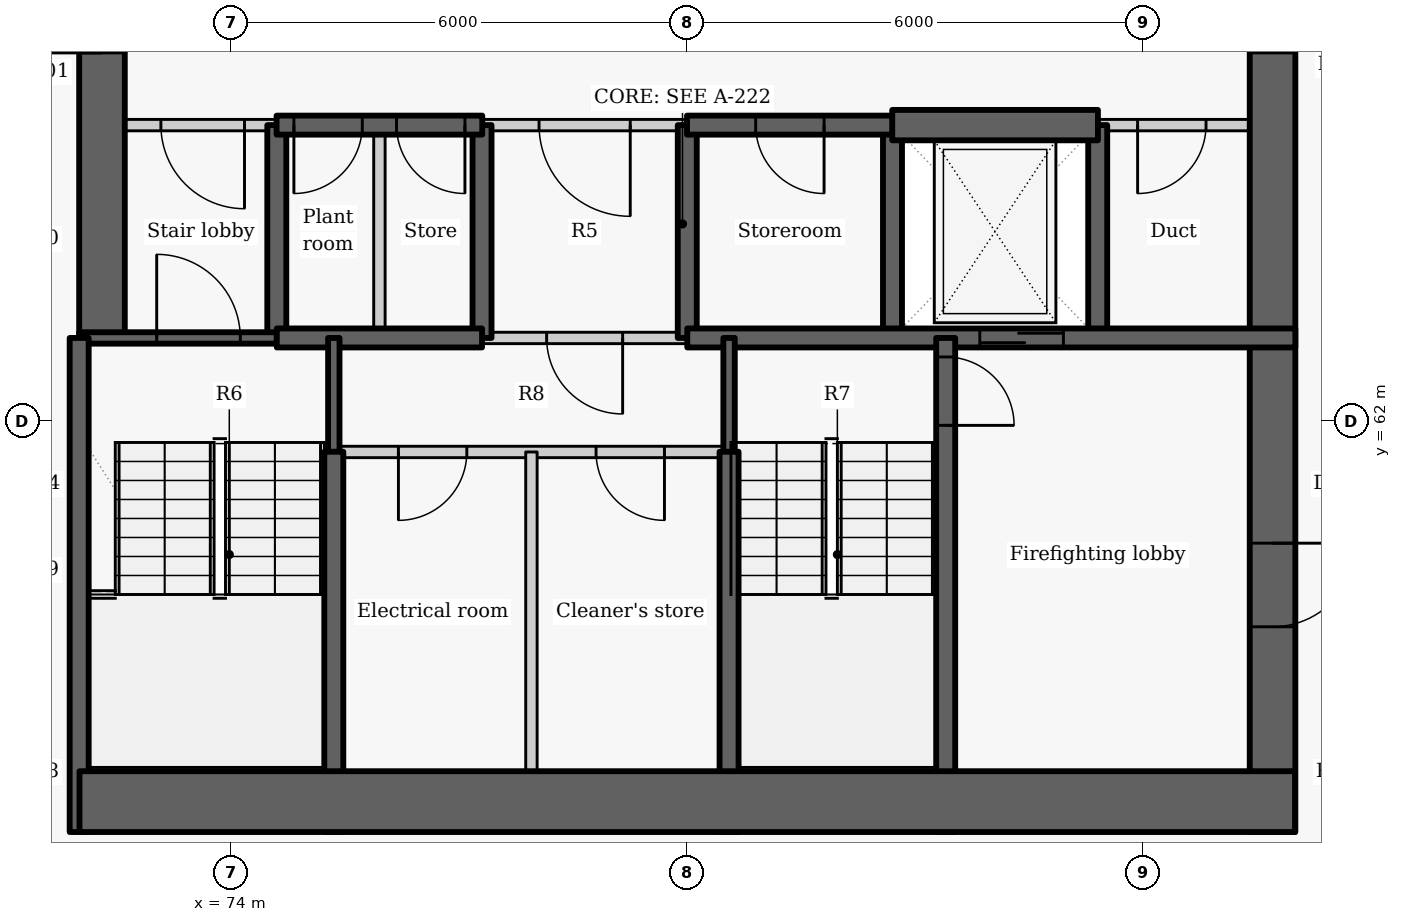
"""IFC4 building model, lengths in metres.
Left out: names, types, materials, properties, quantities, classifications, styles, units other than length and angle.
Written with IfcOpenShell. Run it as: python <this file> out.ifc"""

import sys

from ifc_helpers import new_model, si_unit, direction, frame, frame_2d, origin, place, context, subcontext, project, spatial, rectangle, extrude, element, fill, save


model = new_model("IFC4")
c1 = context("Model", 3, precision=1e-05, world=origin(), true_north=direction((0.0, 1.0)))
c2 = subcontext(c1, "Body", "Model", "MODEL_VIEW")
j1 = project(units=[si_unit("LENGTHUNIT", "METRE"), si_unit("PLANEANGLEUNIT", "RADIAN")], contexts=[c1])
p1 = place(None, origin())
s1 = spatial("IfcSite", under=j1, at=p1, CompositionType="ELEMENT")
p2 = place(p1, origin())
s2 = spatial("IfcBuilding", under=s1, at=p2, CompositionType="ELEMENT")
p3 = place(p2, frame((0.0, 0.0, 117.3)))
s3 = spatial("IfcBuildingStorey", under=s2, at=p3, CompositionType="ELEMENT", Elevation=117.3)
p4 = place(p3, frame((74.6, 63.1, -0.275), z_axis=(0.0, 0.0, 1.0), x_axis=(0.0, 1.0, 0.0)))
e1 = element("IfcWall", 1, at=p4, inside=s3, PredefinedType="SHEAR", context=c2, shape_type="SweptSolid", body=[
    extrude(rectangle(XDim=2.8, YDim=0.25, at=frame_2d((1.4, 0.0))), origin(), (0.0, 0.0, 1.0), 3.225),
])
p5 = place(p3, frame((72.3, 63.1, -0.275), z_axis=(0.0, 0.0, 1.0), x_axis=(0.0, 1.0, 0.0)))
e2 = element("IfcWall", 2, at=p5, inside=s3, PredefinedType="SHEAR", context=c2, shape_type="SweptSolid", body=[
    extrude(rectangle(XDim=9.1, YDim=0.6, at=frame_2d((4.55, 0.0))), origin(), (0.0, 0.0, 1.0), 3.225),
])
p6 = place(p5, frame((3.75, 0.0, 0.275)))
e3 = element("IfcOpeningElement", 3, at=p6, cuts=e2, PredefinedType="OPENING", context=c2, shape_type="SweptSolid", body=[
    extrude(rectangle(XDim=1.5, YDim=2.1, at=frame_2d((0.75, 1.05))), frame((0.0, 0.31, 0.0), z_axis=(0.0, -1.0, 0.0), x_axis=(1.0, 0.0, 0.0)), (0.0, 0.0, 1.0), 0.62),
])
for number, where, z_axis, x_axis in (
    (4, (77.3, 63.1, -0.275), (0.0, 0.0, 1.0), (0.0, 1.0, 0.0)),
    (5, (80.0, 63.1, -0.275), (0.0, 0.0, 1.0), (0.0, 1.0, 0.0)),
    (6, (82.7, 63.1, -0.275), (0.0, 0.0, 1.0), (0.0, 1.0, 0.0)),
    (7, (85.4, 63.1, -0.275), (0.0, 0.0, 1.0), (0.0, 1.0, 0.0)),
):
    element("IfcWall", number, at=place(p3, frame(where, z_axis=z_axis, x_axis=x_axis)), inside=s3, PredefinedType="SHEAR", context=c2, shape_type="SweptSolid", body=[
        extrude(rectangle(XDim=2.8, YDim=0.25, at=frame_2d((1.4, 0.0))), origin(), (0.0, 0.0, 1.0), 3.225),
    ])
p7 = place(p3, frame((87.7, 72.2, -0.275), z_axis=(0.0, 0.0, 1.0), x_axis=(0.0, -1.0, 0.0)))
e8 = element("IfcWall", 8, at=p7, inside=s3, PredefinedType="SHEAR", context=c2, shape_type="SweptSolid", body=[
    extrude(rectangle(XDim=15.6, YDim=0.6, at=frame_2d((7.8, 0.0))), origin(), (0.0, 0.0, 1.0), 3.225),
])
p8 = place(p7, frame((3.85, 0.0, 0.275)))
e9 = element("IfcOpeningElement", 9, at=p8, cuts=e8, PredefinedType="OPENING", context=c2, shape_type="SweptSolid", body=[
    extrude(rectangle(XDim=1.5, YDim=2.1, at=frame_2d((0.75, 1.05))), frame((0.0, 0.31, 0.0), z_axis=(0.0, -1.0, 0.0), x_axis=(1.0, 0.0, 0.0)), (0.0, 0.0, 1.0), 0.62),
])
p9 = place(p7, frame((11.8, 0.0, 0.275)))
e10 = element("IfcOpeningElement", 10, at=p9, cuts=e8, PredefinedType="OPENING", context=c2, shape_type="SweptSolid", body=[
    extrude(rectangle(XDim=1.1, YDim=2.1, at=frame_2d((0.55, 1.05))), frame((0.0, 0.31, 0.0), z_axis=(0.0, -1.0, 0.0), x_axis=(1.0, 0.0, 0.0)), (0.0, 0.0, 1.0), 0.62),
])
p10 = place(p3, frame((74.603, 65.9, 0.0), z_axis=(0.0, 0.0, 1.0), x_axis=(-1.0, 0.0, 0.0)))
e11 = element("IfcWall", 11, at=p10, inside=s3, PredefinedType="PARTITIONING", context=c2, shape_type="SweptSolid", body=[
    extrude(rectangle(XDim=2.603, YDim=0.15, at=frame_2d((1.302, 0.0))), origin(), (0.0, 0.0, 1.0), 2.95),
])
p11 = place(p10, frame((0.428, 0.0, 0.0)))
e12 = element("IfcOpeningElement", 12, at=p11, cuts=e11, PredefinedType="OPENING", context=c2, shape_type="SweptSolid", body=[
    extrude(rectangle(XDim=1.1, YDim=2.1, at=frame_2d((0.55, 1.05))), frame((0.0, 0.085, 0.0), z_axis=(0.0, -1.0, 0.0), x_axis=(1.0, 0.0, 0.0)), (0.0, 0.0, 1.0), 0.17),
])
p12 = place(p3, frame((80.003, 65.9, 0.0), z_axis=(0.0, 0.0, 1.0), x_axis=(-1.0, 0.0, 0.0)))
e13 = element("IfcWall", 13, at=p12, inside=s3, PredefinedType="PARTITIONING", context=c2, shape_type="SweptSolid", body=[
    extrude(rectangle(XDim=2.706, YDim=0.15, at=frame_2d((1.353, 0.0))), origin(), (0.0, 0.0, 1.0), 2.95),
])
p13 = place(p12, frame((0.753, 0.0, 0.0)))
e14 = element("IfcOpeningElement", 14, at=p13, cuts=e13, PredefinedType="OPENING", context=c2, shape_type="SweptSolid", body=[
    extrude(rectangle(XDim=1.2, YDim=2.1, at=frame_2d((0.6, 1.05))), frame((0.0, 0.085, 0.0), z_axis=(0.0, -1.0, 0.0), x_axis=(1.0, 0.0, 0.0)), (0.0, 0.0, 1.0), 0.17),
])
p14 = place(p3, frame((88.0, 65.9, 0.0), z_axis=(0.0, 0.0, 1.0), x_axis=(-1.0, 0.0, 0.0)))
e15 = element("IfcWall", 15, at=p14, inside=s3, PredefinedType="PARTITIONING", context=c2, shape_type="SweptSolid", body=[
    extrude(rectangle(XDim=2.603, YDim=0.15, at=frame_2d((1.302, 0.0))), origin(), (0.0, 0.0, 1.0), 2.95),
])
p15 = place(p14, frame((1.175, 0.0, 0.0)))
e16 = element("IfcOpeningElement", 16, at=p15, cuts=e15, PredefinedType="OPENING", context=c2, shape_type="SweptSolid", body=[
    extrude(rectangle(XDim=0.9, YDim=2.1, at=frame_2d((0.45, 1.05))), frame((0.0, 0.085, 0.0), z_axis=(0.0, -1.0, 0.0), x_axis=(1.0, 0.0, 0.0)), (0.0, 0.0, 1.0), 0.17),
])
p16 = place(p3, frame((77.303, 65.9, -0.275), z_axis=(0.0, 0.0, 1.0), x_axis=(-1.0, 0.0, 0.0)))
e17 = element("IfcWall", 17, at=p16, inside=s3, PredefinedType="SHEAR", context=c2, shape_type="SweptSolid", body=[
    extrude(rectangle(XDim=2.706, YDim=0.25, at=frame_2d((1.353, 0.0))), origin(), (0.0, 0.0, 1.0), 3.225),
])
p17 = place(p16, frame((1.578, 0.0, 0.275)))
e18 = element("IfcOpeningElement", 18, at=p17, cuts=e17, PredefinedType="OPENING", context=c2, shape_type="SweptSolid", body=[
    extrude(rectangle(XDim=0.9, YDim=2.1, at=frame_2d((0.45, 1.05))), frame((0.0, 0.135, 0.0), z_axis=(0.0, -1.0, 0.0), x_axis=(1.0, 0.0, 0.0)), (0.0, 0.0, 1.0), 0.27),
])
p18 = place(p16, frame((0.228, 0.0, 0.275)))
e19 = element("IfcOpeningElement", 19, at=p18, cuts=e17, PredefinedType="OPENING", context=c2, shape_type="SweptSolid", body=[
    extrude(rectangle(XDim=0.9, YDim=2.1, at=frame_2d((0.45, 1.05))), frame((0.0, 0.135, 0.0), z_axis=(0.0, -1.0, 0.0), x_axis=(1.0, 0.0, 0.0)), (0.0, 0.0, 1.0), 0.27),
])
p19 = place(p3, frame((82.703, 65.9, -0.275), z_axis=(0.0, 0.0, 1.0), x_axis=(-1.0, 0.0, 0.0)))
e20 = element("IfcWall", 20, at=p19, inside=s3, PredefinedType="SHEAR", context=c2, shape_type="SweptSolid", body=[
    extrude(rectangle(XDim=2.706, YDim=0.25, at=frame_2d((1.353, 0.0))), origin(), (0.0, 0.0, 1.0), 3.225),
])
p20 = place(p19, frame((0.903, 0.0, 0.275)))
e21 = element("IfcOpeningElement", 21, at=p20, cuts=e20, PredefinedType="OPENING", context=c2, shape_type="SweptSolid", body=[
    extrude(rectangle(XDim=0.9, YDim=2.1, at=frame_2d((0.45, 1.05))), frame((0.0, 0.135, 0.0), z_axis=(0.0, -1.0, 0.0), x_axis=(1.0, 0.0, 0.0)), (0.0, 0.0, 1.0), 0.27),
])
p21 = place(p3, frame((82.697, 65.9, -0.275), z_axis=(0.0, 0.0, 1.0), x_axis=(1.0, 0.0, 0.0)))
e22 = element("IfcWall", 22, at=p21, inside=s3, PredefinedType="SHEAR", context=c2, shape_type="SweptSolid", body=[
    extrude(rectangle(XDim=2.706, YDim=0.4, at=frame_2d((1.353, 0.0))), origin(), (0.0, 0.0, 1.0), 3.225),
])
p22 = place(p3, frame((72.0, 63.1, -0.275), z_axis=(0.0, 0.0, 1.0), x_axis=(1.0, 0.0, 0.0)))
e23 = element("IfcWall", 23, at=p22, inside=s3, PredefinedType="SHEAR", context=c2, shape_type="SweptSolid", body=[
    extrude(rectangle(XDim=2.6, YDim=0.15, at=frame_2d((1.3, 0.0))), origin(), (0.0, 0.0, 1.0), 3.225),
])
p23 = place(p22, frame((1.02, 0.0, 0.275)))
e24 = element("IfcOpeningElement", 24, at=p23, cuts=e23, PredefinedType="OPENING", context=c2, shape_type="SweptSolid", body=[
    extrude(rectangle(XDim=1.1, YDim=2.1, at=frame_2d((0.55, 1.05))), frame((0.0, 0.085, 0.0), z_axis=(0.0, -1.0, 0.0), x_axis=(1.0, 0.0, 0.0)), (0.0, 0.0, 1.0), 0.17),
])
p24 = place(p3, frame((75.95, 63.1, 0.0), z_axis=(0.0, 0.0, 1.0), x_axis=(0.0, 1.0, 0.0)))
e25 = element("IfcWall", 25, at=p24, inside=s3, PredefinedType="PARTITIONING", context=c2, shape_type="SweptSolid", body=[
    extrude(rectangle(XDim=2.8, YDim=0.15, at=frame_2d((1.4, 0.0))), origin(), (0.0, 0.0, 1.0), 2.95),
])
p25 = place(p3, frame((74.6, 63.1, -0.275), z_axis=(0.0, 0.0, 1.0), x_axis=(1.0, 0.0, 0.0)))
e26 = element("IfcWall", 26, at=p25, inside=s3, PredefinedType="SHEAR", context=c2, shape_type="SweptSolid", body=[
    extrude(rectangle(XDim=2.7, YDim=0.25, at=frame_2d((1.35, 0.0))), origin(), (0.0, 0.0, 1.0), 3.225),
])
p26 = place(p3, frame((80.0, 63.1, -0.275), z_axis=(0.0, 0.0, 1.0), x_axis=(1.0, 0.0, 0.0)))
e27 = element("IfcWall", 27, at=p26, inside=s3, PredefinedType="SHEAR", context=c2, shape_type="SweptSolid", body=[
    extrude(rectangle(XDim=8.0, YDim=0.25, at=frame_2d((4.0, 0.0))), origin(), (0.0, 0.0, 1.0), 3.225),
])
p27 = place(p26, frame((3.849, 0.0, 0.275)))
e28 = element("IfcOpeningElement", 28, at=p27, cuts=e27, PredefinedType="OPENING", context=c2, shape_type="SweptSolid", body=[
    extrude(rectangle(XDim=1.1, YDim=2.1, at=frame_2d((0.55, 1.05))), frame((0.0, 0.135, 0.0), z_axis=(0.0, -1.0, 0.0), x_axis=(1.0, 0.0, 0.0)), (0.0, 0.0, 1.0), 0.27),
])
p28 = place(p3, frame((80.0, 63.1, 0.0), z_axis=(0.0, 0.0, 1.0), x_axis=(-1.0, 0.0, 0.0)))
e29 = element("IfcWall", 29, at=p28, inside=s3, PredefinedType="PARTITIONING", context=c2, shape_type="SweptSolid", body=[
    extrude(rectangle(XDim=2.7, YDim=0.15, at=frame_2d((1.35, 0.0))), origin(), (0.0, 0.0, 1.0), 2.95),
])
p29 = place(p28, frame((0.85, 0.0, 0.0)))
e30 = element("IfcOpeningElement", 30, at=p29, cuts=e29, PredefinedType="OPENING", context=c2, shape_type="SweptSolid", body=[
    extrude(rectangle(XDim=1.0, YDim=2.1, at=frame_2d((0.5, 1.05))), frame((0.0, 0.085, 0.0), z_axis=(0.0, -1.0, 0.0), x_axis=(1.0, 0.0, 0.0)), (0.0, 0.0, 1.0), 0.17),
])
p30 = place(p3, frame((75.35, 61.597, -0.275), z_axis=(0.0, 0.0, 1.0), x_axis=(0.0, 1.0, 0.0)))
e31 = element("IfcWall", 31, at=p30, inside=s3, PredefinedType="SHEAR", context=c2, shape_type="SweptSolid", body=[
    extrude(rectangle(XDim=1.503, YDim=0.15, at=frame_2d((0.751, 0.0))), origin(), (0.0, 0.0, 1.0), 3.225),
])
p31 = place(p3, frame((75.35, 56.6, -0.275), z_axis=(0.0, 0.0, 1.0), x_axis=(0.0, 1.0, 0.0)))
e32 = element("IfcWall", 32, at=p31, inside=s3, PredefinedType="SHEAR", context=c2, shape_type="SweptSolid", body=[
    extrude(rectangle(XDim=5.003, YDim=0.25, at=frame_2d((2.501, 0.0))), origin(), (0.0, 0.0, 1.0), 3.225),
])
p32 = place(p3, frame((72.0, 56.6, -0.275), z_axis=(0.0, 0.0, 1.0), x_axis=(0.0, 1.0, 0.0)))
e33 = element("IfcWall", 33, at=p32, inside=s3, PredefinedType="SHEAR", context=c2, shape_type="SweptSolid", body=[
    extrude(rectangle(XDim=6.5, YDim=0.25, at=frame_2d((3.25, 0.0))), origin(), (0.0, 0.0, 1.0), 3.225),
])
p33 = place(p3, frame((83.4, 63.1, -0.275), z_axis=(0.0, 0.0, 1.0), x_axis=(0.0, -1.0, 0.0)))
e34 = element("IfcWall", 34, at=p33, inside=s3, PredefinedType="SHEAR", context=c2, shape_type="SweptSolid", body=[
    extrude(rectangle(XDim=6.5, YDim=0.25, at=frame_2d((3.25, 0.0))), origin(), (0.0, 0.0, 1.0), 3.225),
])
p34 = place(p33, frame((0.25, 0.0, 0.275)))
e35 = element("IfcOpeningElement", 35, at=p34, cuts=e34, PredefinedType="OPENING", context=c2, shape_type="SweptSolid", body=[
    extrude(rectangle(XDim=0.9, YDim=2.1, at=frame_2d((0.45, 1.05))), frame((0.0, 0.135, 0.0), z_axis=(0.0, -1.0, 0.0), x_axis=(1.0, 0.0, 0.0)), (0.0, 0.0, 1.0), 0.27),
])
p35 = place(p3, frame((80.55, 61.597, -0.275), z_axis=(0.0, 0.0, 1.0), x_axis=(0.0, 1.0, 0.0)))
e36 = element("IfcWall", 36, at=p35, inside=s3, PredefinedType="SHEAR", context=c2, shape_type="SweptSolid", body=[
    extrude(rectangle(XDim=1.503, YDim=0.15, at=frame_2d((0.751, 0.0))), origin(), (0.0, 0.0, 1.0), 3.225),
])
p36 = place(p3, frame((80.55, 56.6, -0.275), z_axis=(0.0, 0.0, 1.0), x_axis=(0.0, 1.0, 0.0)))
e37 = element("IfcWall", 37, at=p36, inside=s3, PredefinedType="SHEAR", context=c2, shape_type="SweptSolid", body=[
    extrude(rectangle(XDim=5.003, YDim=0.25, at=frame_2d((2.501, 0.0))), origin(), (0.0, 0.0, 1.0), 3.225),
])
p37 = place(p3, frame((80.55, 61.6, 0.0), z_axis=(0.0, 0.0, 1.0), x_axis=(-1.0, 0.0, 0.0)))
e38 = element("IfcWall", 38, at=p37, inside=s3, PredefinedType="PARTITIONING", context=c2, shape_type="SweptSolid", body=[
    extrude(rectangle(XDim=5.2, YDim=0.15, at=frame_2d((2.6, 0.0))), origin(), (0.0, 0.0, 1.0), 2.95),
])
p38 = place(p37, frame((3.45, 0.0, 0.0)))
e39 = element("IfcOpeningElement", 39, at=p38, cuts=e38, PredefinedType="OPENING", context=c2, shape_type="SweptSolid", body=[
    extrude(rectangle(XDim=0.9, YDim=2.1, at=frame_2d((0.45, 1.05))), frame((0.0, 0.085, 0.0), z_axis=(0.0, -1.0, 0.0), x_axis=(1.0, 0.0, 0.0)), (0.0, 0.0, 1.0), 0.17),
])
p39 = place(p37, frame((0.85, 0.0, 0.0)))
e40 = element("IfcOpeningElement", 40, at=p39, cuts=e38, PredefinedType="OPENING", context=c2, shape_type="SweptSolid", body=[
    extrude(rectangle(XDim=0.9, YDim=2.1, at=frame_2d((0.45, 1.05))), frame((0.0, 0.085, 0.0), z_axis=(0.0, -1.0, 0.0), x_axis=(1.0, 0.0, 0.0)), (0.0, 0.0, 1.0), 0.17),
])
p40 = place(p3, frame((77.95, 56.6, 0.0), z_axis=(0.0, 0.0, 1.0), x_axis=(0.0, 1.0, 0.0)))
e41 = element("IfcWall", 41, at=p40, inside=s3, PredefinedType="PARTITIONING", context=c2, shape_type="SweptSolid", body=[
    extrude(rectangle(XDim=5.0, YDim=0.15, at=frame_2d((2.5, 0.0))), origin(), (0.0, 0.0, 1.0), 2.95),
])
p41 = place(p3, frame((72.004, 57.0, -0.275), z_axis=(0.0, 0.0, 1.0), x_axis=(1.0, 0.0, 0.0)))
e42 = element("IfcWall", 42, at=p41, inside=s3, PredefinedType="SHEAR", context=c2, shape_type="SweptSolid", body=[
    extrude(rectangle(XDim=15.992, YDim=0.8, at=frame_2d((7.996, 0.0))), origin(), (0.0, 0.0, 1.0), 3.225),
])
p42 = place(p11, origin())
e43 = element("IfcDoor", 43, at=p42, inside=s3, OperationType="SINGLE_SWING_LEFT", PredefinedType="DOOR", context=c2, shape_type="SweptSolid", body=[
    extrude(rectangle(XDim=1.1, YDim=2.1, at=frame_2d((0.55, 1.05))), frame((0.0, 0.025, 0.0), z_axis=(0.0, -1.0, 0.0), x_axis=(1.0, 0.0, 0.0)), (0.0, 0.0, 1.0), 0.05),
])
fill(e12, e43)
p43 = place(p17, origin())
e44 = element("IfcDoor", 44, at=p43, inside=s3, OperationType="SINGLE_SWING_RIGHT", PredefinedType="DOOR", context=c2, shape_type="SweptSolid", body=[
    extrude(rectangle(XDim=0.9, YDim=2.1, at=frame_2d((0.45, 1.05))), frame((0.0, 0.025, 0.0), z_axis=(0.0, -1.0, 0.0), x_axis=(1.0, 0.0, 0.0)), (0.0, 0.0, 1.0), 0.05),
])
fill(e18, e44)
p44 = place(p18, origin())
e45 = element("IfcDoor", 45, at=p44, inside=s3, OperationType="SINGLE_SWING_LEFT", PredefinedType="DOOR", context=c2, shape_type="SweptSolid", body=[
    extrude(rectangle(XDim=0.9, YDim=2.1, at=frame_2d((0.45, 1.05))), frame((0.0, 0.025, 0.0), z_axis=(0.0, -1.0, 0.0), x_axis=(1.0, 0.0, 0.0)), (0.0, 0.0, 1.0), 0.05),
])
fill(e19, e45)
p45 = place(p13, origin())
e46 = element("IfcDoor", 46, at=p45, inside=s3, OperationType="DOUBLE_DOOR_SINGLE_SWING", PredefinedType="DOOR", context=c2, shape_type="SweptSolid", body=[
    extrude(rectangle(XDim=1.2, YDim=2.1, at=frame_2d((0.6, 1.05))), frame((0.0, 0.025, 0.0), z_axis=(0.0, -1.0, 0.0), x_axis=(1.0, 0.0, 0.0)), (0.0, 0.0, 1.0), 0.05),
])
fill(e14, e46)
p46 = place(p20, origin())
e47 = element("IfcDoor", 47, at=p46, inside=s3, OperationType="SINGLE_SWING_LEFT", PredefinedType="DOOR", context=c2, shape_type="SweptSolid", body=[
    extrude(rectangle(XDim=0.9, YDim=2.1, at=frame_2d((0.45, 1.05))), frame((0.0, 0.025, 0.0), z_axis=(0.0, -1.0, 0.0), x_axis=(1.0, 0.0, 0.0)), (0.0, 0.0, 1.0), 0.05),
])
fill(e21, e47)
p47 = place(p27, origin())
e48 = element("IfcDoor", 48, at=p47, inside=s3, OperationType="SLIDING_TO_LEFT", PredefinedType="DOOR", context=c2, shape_type="SweptSolid", body=[
    extrude(rectangle(XDim=1.1, YDim=2.1, at=frame_2d((0.55, 1.05))), frame((0.0, 0.025, 0.0), z_axis=(0.0, -1.0, 0.0), x_axis=(1.0, 0.0, 0.0)), (0.0, 0.0, 1.0), 0.05),
])
fill(e28, e48)
p48 = place(p15, origin())
e49 = element("IfcDoor", 49, at=p48, inside=s3, OperationType="SINGLE_SWING_RIGHT", PredefinedType="DOOR", context=c2, shape_type="SweptSolid", body=[
    extrude(rectangle(XDim=0.9, YDim=2.1, at=frame_2d((0.45, 1.05))), frame((0.0, 0.025, 0.0), z_axis=(0.0, -1.0, 0.0), x_axis=(1.0, 0.0, 0.0)), (0.0, 0.0, 1.0), 0.05),
])
fill(e16, e49)
p49 = place(p29, origin())
e50 = element("IfcDoor", 50, at=p49, inside=s3, OperationType="SINGLE_SWING_LEFT", PredefinedType="DOOR", context=c2, shape_type="SweptSolid", body=[
    extrude(rectangle(XDim=1.0, YDim=2.1, at=frame_2d((0.5, 1.05))), frame((0.0, 0.025, 0.0), z_axis=(0.0, -1.0, 0.0), x_axis=(1.0, 0.0, 0.0)), (0.0, 0.0, 1.0), 0.05),
])
fill(e30, e50)
p50 = place(p38, origin())
e51 = element("IfcDoor", 51, at=p50, inside=s3, OperationType="SINGLE_SWING_RIGHT", PredefinedType="DOOR", context=c2, shape_type="SweptSolid", body=[
    extrude(rectangle(XDim=0.9, YDim=2.1, at=frame_2d((0.45, 1.05))), frame((0.0, 0.025, 0.0), z_axis=(0.0, -1.0, 0.0), x_axis=(1.0, 0.0, 0.0)), (0.0, 0.0, 1.0), 0.05),
])
fill(e39, e51)
p51 = place(p39, origin())
e52 = element("IfcDoor", 52, at=p51, inside=s3, OperationType="SINGLE_SWING_LEFT", PredefinedType="DOOR", context=c2, shape_type="SweptSolid", body=[
    extrude(rectangle(XDim=0.9, YDim=2.1, at=frame_2d((0.45, 1.05))), frame((0.0, 0.025, 0.0), z_axis=(0.0, -1.0, 0.0), x_axis=(1.0, 0.0, 0.0)), (0.0, 0.0, 1.0), 0.05),
])
fill(e40, e52)
p52 = place(p23, origin())
e53 = element("IfcDoor", 53, at=p52, inside=s3, OperationType="SINGLE_SWING_LEFT", PredefinedType="DOOR", context=c2, shape_type="SweptSolid", body=[
    extrude(rectangle(XDim=1.1, YDim=2.1, at=frame_2d((0.55, 1.05))), frame((0.0, 0.025, 0.0), z_axis=(0.0, -1.0, 0.0), x_axis=(1.0, 0.0, 0.0)), (0.0, 0.0, 1.0), 0.05),
])
fill(e24, e53)
p53 = place(p34, origin())
e54 = element("IfcDoor", 54, at=p53, inside=s3, OperationType="SINGLE_SWING_RIGHT", PredefinedType="DOOR", context=c2, shape_type="SweptSolid", body=[
    extrude(rectangle(XDim=0.9, YDim=2.1, at=frame_2d((0.45, 1.05))), frame((0.0, 0.025, 0.0), z_axis=(0.0, -1.0, 0.0), x_axis=(1.0, 0.0, 0.0)), (0.0, 0.0, 1.0), 0.05),
])
fill(e35, e54)
p54 = place(p8, origin())
e55 = element("IfcDoor", 55, at=p54, inside=s3, OperationType="DOUBLE_DOOR_SINGLE_SWING", PredefinedType="DOOR", context=c2, shape_type="SweptSolid", body=[
    extrude(rectangle(XDim=1.5, YDim=2.1, at=frame_2d((0.75, 1.05))), frame((0.0, 0.025, 0.0), z_axis=(0.0, -1.0, 0.0), x_axis=(1.0, 0.0, 0.0)), (0.0, 0.0, 1.0), 0.05),
])
fill(e9, e55)
p55 = place(p9, origin())
e56 = element("IfcDoor", 56, at=p55, inside=s3, OperationType="SINGLE_SWING_LEFT", PredefinedType="DOOR", context=c2, shape_type="SweptSolid", body=[
    extrude(rectangle(XDim=1.1, YDim=2.1, at=frame_2d((0.55, 1.05))), frame((0.0, 0.025, 0.0), z_axis=(0.0, -1.0, 0.0), x_axis=(1.0, 0.0, 0.0)), (0.0, 0.0, 1.0), 0.05),
])
fill(e10, e56)
save(model, sys.argv[1])
